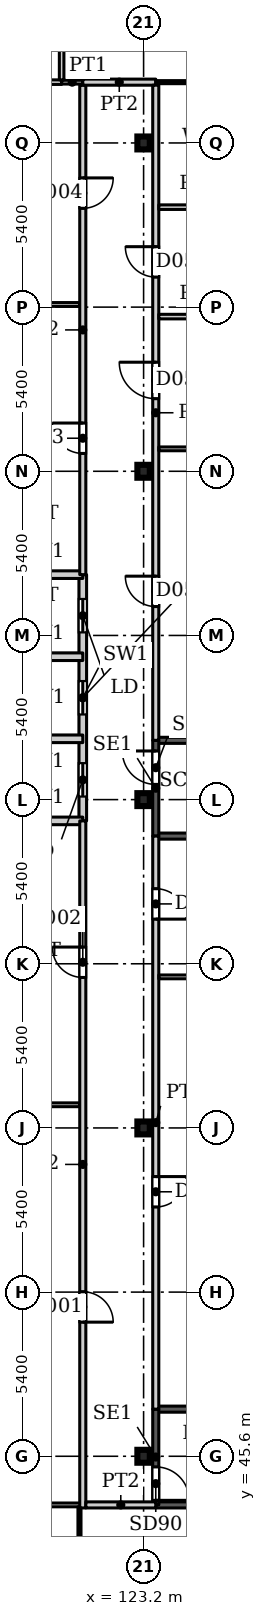
"""IFC4 building model, lengths in metres.
Left out: names, types, materials, properties, quantities, classifications, styles, units other than length and angle.
Written with IfcOpenShell. Run it as: python <this file> out.ifc"""

import sys

from ifc_helpers import new_model, si_unit, direction, frame, frame_2d, origin, origin_2d, place, context, subcontext, project, spatial, rectangle, i_section, extrude, source, transform, mapped, element, fill, save


model = new_model("IFC4")
c1 = context("Model", 3, precision=1e-05, world=origin(), true_north=direction((0.0, 1.0)))
c2 = subcontext(c1, "Body", "Model", "MODEL_VIEW")
j1 = project(units=[si_unit("LENGTHUNIT", "METRE"), si_unit("PLANEANGLEUNIT", "RADIAN")], contexts=[c1])
p1 = place(None, origin())
s1 = spatial("IfcSite", under=j1, at=p1, CompositionType="ELEMENT")
p2 = place(p1, origin())
s2 = spatial("IfcBuilding", under=s1, at=p2, CompositionType="ELEMENT")
p3 = place(p2, frame((0.0, 0.0, 26.0)))
s3 = spatial("IfcBuildingStorey", under=s2, at=p3, CompositionType="ELEMENT", Elevation=26.0)
for number, where, z_axis, x_axis in (
    (1, (123.2, 45.6, 0.0), (0.0, 0.0, 1.0), (1.0, 0.0, 0.0)),
    (2, (123.2, 56.4, 0.0), (0.0, 0.0, 1.0), (1.0, 0.0, 0.0)),
    (3, (123.2, 67.2, 0.0), (0.0, 0.0, 1.0), (1.0, 0.0, 0.0)),
    (4, (123.2, 78.0, 0.0), (0.0, 0.0, 1.0), (1.0, 0.0, 0.0)),
    (5, (123.2, 88.8, 0.0), (0.0, 0.0, 1.0), (1.0, 0.0, 0.0)),
):
    element("IfcColumn", number, at=place(p3, frame(where, z_axis=z_axis, x_axis=x_axis)), inside=s3, PredefinedType="COLUMN", context=c2, shape_type="SweptSolid", body=[
        extrude(i_section(OverallWidth=0.409, OverallDepth=0.425, WebThickness=0.033, FlangeThickness=0.052, FilletRadius=0.013, at=origin_2d()), origin(), (0.0, 0.0, 1.0), 4.5),
    ])
p4 = place(p3, frame((121.2, 66.5, 0.0), z_axis=(0.0, 0.0, 1.0), x_axis=(0.0, 1.0, 0.0)))
e6 = element("IfcWall", 6, at=p4, inside=s3, PredefinedType="PARTITIONING", context=c2, shape_type="SweptSolid", body=[
    extrude(rectangle(XDim=8.1, YDim=0.25, at=frame_2d((4.05, 0.0))), origin(), (0.0, 0.0, 1.0), 4.5),
])
p5 = place(p4, frame((0.8, 0.0, 0.0)))
e7 = element("IfcOpeningElement", 7, at=p5, cuts=e6, PredefinedType="OPENING", context=c2, shape_type="SweptSolid", body=[
    extrude(rectangle(XDim=1.1, YDim=2.2, at=frame_2d((0.55, 1.1))), frame((0.0, 0.135, 0.0), z_axis=(0.0, -1.0, 0.0), x_axis=(1.0, 0.0, 0.0)), (0.0, 0.0, 1.0), 0.27),
])
p6 = place(p4, frame((3.5, 0.0, 0.0)))
e8 = element("IfcOpeningElement", 8, at=p6, cuts=e6, PredefinedType="OPENING", context=c2, shape_type="SweptSolid", body=[
    extrude(rectangle(XDim=1.1, YDim=2.2, at=frame_2d((0.55, 1.1))), frame((0.0, 0.135, 0.0), z_axis=(0.0, -1.0, 0.0), x_axis=(1.0, 0.0, 0.0)), (0.0, 0.0, 1.0), 0.27),
])
p7 = place(p4, frame((6.2, 0.0, 0.0)))
e9 = element("IfcOpeningElement", 9, at=p7, cuts=e6, PredefinedType="OPENING", context=c2, shape_type="SweptSolid", body=[
    extrude(rectangle(XDim=1.1, YDim=2.2, at=frame_2d((0.55, 1.1))), frame((0.0, 0.135, 0.0), z_axis=(0.0, -1.0, 0.0), x_axis=(1.0, 0.0, 0.0)), (0.0, 0.0, 1.0), 0.27),
])
for number, where, z_axis, x_axis in (
    (10, (118.5, 66.5, 0.0), (0.0, 0.0, 1.0), (1.0, 0.0, 0.0)),
    (11, (118.5, 69.2, 0.0), (0.0, 0.0, 1.0), (1.0, 0.0, 0.0)),
    (12, (118.5, 71.9, 0.0), (0.0, 0.0, 1.0), (1.0, 0.0, 0.0)),
    (13, (118.5, 74.6, 0.0), (0.0, 0.0, 1.0), (1.0, 0.0, 0.0)),
):
    element("IfcWall", number, at=place(p3, frame(where, z_axis=z_axis, x_axis=x_axis)), inside=s3, PredefinedType="PARTITIONING", context=c2, shape_type="SweptSolid", body=[
        extrude(rectangle(XDim=2.7, YDim=0.25, at=frame_2d((1.35, 0.0))), origin(), (0.0, 0.0, 1.0), 4.5),
    ])
p8 = place(p3, frame((123.6, 44.0, 0.0), z_axis=(0.0, 0.0, 1.0), x_axis=(1.0, 0.0, 0.0)))
e14 = element("IfcWall", 14, at=p8, inside=s3, PredefinedType="SHEAR", context=c2, shape_type="SweptSolid", body=[
    extrude(rectangle(XDim=7.2, YDim=0.2, at=frame_2d((3.6, 0.0))), origin(), (0.0, 0.0, 1.0), 4.5),
])
p9 = place(p3, frame((123.6, 47.15, 0.0), z_axis=(0.0, 0.0, 1.0), x_axis=(1.0, 0.0, 0.0)))
e15 = element("IfcWall", 15, at=p9, inside=s3, PredefinedType="SHEAR", context=c2, shape_type="SweptSolid", body=[
    extrude(rectangle(XDim=8.4, YDim=0.2, at=frame_2d((4.2, 0.0))), origin(), (0.0, 0.0, 1.0), 4.5),
])
p10 = place(p3, frame((123.6, 44.0, 0.0), z_axis=(0.0, 0.0, 1.0), x_axis=(0.0, 1.0, 0.0)))
e16 = element("IfcWall", 16, at=p10, inside=s3, PredefinedType="SHEAR", context=c2, shape_type="SweptSolid", body=[
    extrude(rectangle(XDim=3.15, YDim=0.2, at=frame_2d((1.575, 0.0))), origin(), (0.0, 0.0, 1.0), 4.5),
])
p11 = place(p10, frame((0.15, 0.0, 0.0)))
e17 = element("IfcOpeningElement", 17, at=p11, cuts=e16, PredefinedType="OPENING", context=c2, shape_type="SweptSolid", body=[
    extrude(rectangle(XDim=1.1, YDim=2.2, at=frame_2d((0.55, 1.1))), frame((0.0, 0.11, 0.0), z_axis=(0.0, -1.0, 0.0), x_axis=(1.0, 0.0, 0.0)), (0.0, 0.0, 1.0), 0.22),
])
p12 = place(p3, frame((123.6, 66.0, 0.0), z_axis=(0.0, 0.0, 1.0), x_axis=(1.0, 0.0, 0.0)))
e18 = element("IfcWall", 18, at=p12, inside=s3, PredefinedType="SHEAR", context=c2, shape_type="SweptSolid", body=[
    extrude(rectangle(XDim=7.2, YDim=0.2, at=frame_2d((3.6, 0.0))), origin(), (0.0, 0.0, 1.0), 4.5),
])
p13 = place(p3, frame((123.6, 69.15, 0.0), z_axis=(0.0, 0.0, 1.0), x_axis=(1.0, 0.0, 0.0)))
e19 = element("IfcWall", 19, at=p13, inside=s3, PredefinedType="SHEAR", context=c2, shape_type="SweptSolid", body=[
    extrude(rectangle(XDim=8.4, YDim=0.2, at=frame_2d((4.2, 0.0))), origin(), (0.0, 0.0, 1.0), 4.5),
])
p14 = place(p3, frame((123.6, 66.0, 0.0), z_axis=(0.0, 0.0, 1.0), x_axis=(0.0, 1.0, 0.0)))
e20 = element("IfcWall", 20, at=p14, inside=s3, PredefinedType="SHEAR", context=c2, shape_type="SweptSolid", body=[
    extrude(rectangle(XDim=3.15, YDim=0.2, at=frame_2d((1.575, 0.0))), origin(), (0.0, 0.0, 1.0), 4.5),
])
p15 = place(p14, frame((1.7, 0.0, 0.0)))
e21 = element("IfcOpeningElement", 21, at=p15, cuts=e20, PredefinedType="OPENING", context=c2, shape_type="SweptSolid", body=[
    extrude(rectangle(XDim=1.1, YDim=2.2, at=frame_2d((0.55, 1.1))), frame((0.0, 0.11, 0.0), z_axis=(0.0, -1.0, 0.0), x_axis=(1.0, 0.0, 0.0)), (0.0, 0.0, 1.0), 0.22),
])
p16 = place(p3, frame((110.183, 90.8, 0.0), z_axis=(0.0, 0.0, 1.0), x_axis=(1.0, 0.0, 0.0)))
e22 = element("IfcWall", 22, at=p16, inside=s3, PredefinedType="PARTITIONING", context=c2, shape_type="SweptSolid", body=[
    extrude(rectangle(XDim=10.321, YDim=0.15, at=frame_2d((5.16, 0.0))), origin(), (0.0, 0.0, 1.0), 4.2),
])
p17 = place(p3, frame((112.862, 44.0, 0.0), z_axis=(0.0, 0.0, 1.0), x_axis=(1.0, 0.0, 0.0)))
e23 = element("IfcWall", 23, at=p17, inside=s3, PredefinedType="PARTITIONING", context=c2, shape_type="SweptSolid", body=[
    extrude(rectangle(XDim=8.279, YDim=0.125, at=frame_2d((4.14, 0.0))), origin(), (0.0, 0.0, 1.0), 4.2),
])
for number, where, z_axis, x_axis in (
    (24, (112.862, 57.162, 0.0), (0.0, 0.0, 1.0), (1.0, 0.0, 0.0)),
    (25, (112.862, 83.487, 0.0), (0.0, 0.0, 1.0), (1.0, 0.0, 0.0)),
):
    element("IfcWall", number, at=place(p3, frame(where, z_axis=z_axis, x_axis=x_axis)), inside=s3, PredefinedType="PARTITIONING", context=c2, shape_type="SweptSolid", body=[
        extrude(rectangle(XDim=8.238, YDim=0.125, at=frame_2d((4.119, 0.0))), origin(), (0.0, 0.0, 1.0), 4.2),
    ])
p18 = place(p3, frame((120.504, 90.8, 0.0), z_axis=(0.0, 0.0, 1.0), x_axis=(1.0, 0.0, 0.0)))
e26 = element("IfcWall", 26, at=p18, inside=s3, PredefinedType="PARTITIONING", context=c2, shape_type="SweptSolid", body=[
    extrude(rectangle(XDim=0.696, YDim=0.125, at=frame_2d((0.348, 0.0))), origin(), (0.0, 0.0, 1.0), 4.2),
])
p19 = place(p3, frame((120.504, 90.875, 0.0), z_axis=(0.0, 0.0, 1.0), x_axis=(0.0, 1.0, 0.0)))
e27 = element("IfcWall", 27, at=p19, inside=s3, PredefinedType="PARTITIONING", context=c2, shape_type="SweptSolid", body=[
    extrude(rectangle(XDim=8.225, YDim=0.15, at=frame_2d((4.113, 0.0))), origin(), (0.0, 0.0, 1.0), 4.2),
])
p20 = place(p3, frame((121.091, 35.3, 0.0), z_axis=(0.0, 0.0, 1.0), x_axis=(0.0, 1.0, 0.0)))
e28 = element("IfcWall", 28, at=p20, inside=s3, PredefinedType="PARTITIONING", context=c2, shape_type="SweptSolid", body=[
    extrude(rectangle(XDim=8.638, YDim=0.1, at=frame_2d((4.319, 0.0))), origin(), (0.0, 0.0, 1.0), 4.2),
])
p21 = place(p3, frame((121.2, 43.9, 0.0), z_axis=(0.0, 0.0, 1.0), x_axis=(0.0, 1.0, 0.0)))
e29 = element("IfcWall", 29, at=p21, inside=s3, PredefinedType="PARTITIONING", context=c2, shape_type="SweptSolid", body=[
    extrude(rectangle(XDim=22.6, YDim=0.2, at=frame_2d((11.3, 0.0))), origin(), (0.0, 0.0, 1.0), 4.2),
])
p22 = place(p21, frame((6.112, 0.0, 0.0)))
e30 = element("IfcOpeningElement", 30, at=p22, cuts=e29, PredefinedType="OPENING", context=c2, shape_type="SweptSolid", body=[
    extrude(rectangle(XDim=1.0, YDim=2.1, at=frame_2d((0.5, 1.05))), frame((0.0, 0.11, 0.0), z_axis=(0.0, -1.0, 0.0), x_axis=(1.0, 0.0, 0.0)), (0.0, 0.0, 1.0), 0.22),
])
p23 = place(p21, frame((17.45, 0.0, 0.0)))
e31 = element("IfcOpeningElement", 31, at=p23, cuts=e29, PredefinedType="OPENING", context=c2, shape_type="SweptSolid", body=[
    extrude(rectangle(XDim=1.0, YDim=2.1, at=frame_2d((0.5, 1.05))), frame((0.0, 0.11, 0.0), z_axis=(0.0, -1.0, 0.0), x_axis=(1.0, 0.0, 0.0)), (0.0, 0.0, 1.0), 0.22),
])
p24 = place(p3, frame((121.2, 74.6, 0.0), z_axis=(0.0, 0.0, 1.0), x_axis=(0.0, 1.0, 0.0)))
e32 = element("IfcWall", 32, at=p24, inside=s3, PredefinedType="PARTITIONING", context=c2, shape_type="SweptSolid", body=[
    extrude(rectangle(XDim=16.1, YDim=0.2, at=frame_2d((8.05, 0.0))), origin(), (0.0, 0.0, 1.0), 4.2),
])
p25 = place(p24, frame((3.987, 0.0, 0.0)))
e33 = element("IfcOpeningElement", 33, at=p25, cuts=e32, PredefinedType="OPENING", context=c2, shape_type="SweptSolid", body=[
    extrude(rectangle(XDim=1.0, YDim=2.1, at=frame_2d((0.5, 1.05))), frame((0.0, 0.11, 0.0), z_axis=(0.0, -1.0, 0.0), x_axis=(1.0, 0.0, 0.0)), (0.0, 0.0, 1.0), 0.22),
])
p26 = place(p24, frame((12.05, 0.0, 0.0)))
e34 = element("IfcOpeningElement", 34, at=p26, cuts=e32, PredefinedType="OPENING", context=c2, shape_type="SweptSolid", body=[
    extrude(rectangle(XDim=1.0, YDim=2.1, at=frame_2d((0.5, 1.05))), frame((0.0, 0.11, 0.0), z_axis=(0.0, -1.0, 0.0), x_axis=(1.0, 0.0, 0.0)), (0.0, 0.0, 1.0), 0.22),
])
p27 = place(p3, frame((121.2, 90.8, 0.0), z_axis=(0.0, 0.0, 1.0), x_axis=(1.0, 0.0, 0.0)))
e35 = element("IfcWall", 35, at=p27, inside=s3, PredefinedType="PARTITIONING", context=c2, shape_type="SweptSolid", body=[
    extrude(rectangle(XDim=2.4, YDim=0.2, at=frame_2d((1.2, 0.0))), origin(), (0.0, 0.0, 1.0), 4.2),
])
p28 = place(p3, frame((121.3, 44.0, 0.0), z_axis=(0.0, 0.0, 1.0), x_axis=(1.0, 0.0, 0.0)))
e36 = element("IfcWall", 36, at=p28, inside=s3, PredefinedType="PARTITIONING", context=c2, shape_type="SweptSolid", body=[
    extrude(rectangle(XDim=2.3, YDim=0.2, at=frame_2d((1.15, 0.0))), origin(), (0.0, 0.0, 1.0), 4.2),
])
p29 = place(p3, frame((123.6, 47.15, 0.0), z_axis=(0.0, 0.0, 1.0), x_axis=(0.0, 1.0, 0.0)))
e37 = element("IfcWall", 37, at=p29, inside=s3, PredefinedType="PARTITIONING", context=c2, shape_type="SweptSolid", body=[
    extrude(rectangle(XDim=18.85, YDim=0.2, at=frame_2d((9.425, 0.0))), origin(), (0.0, 0.0, 1.0), 4.2),
])
p30 = place(p29, frame((6.65, 0.0, 0.0)))
e38 = element("IfcOpeningElement", 38, at=p30, cuts=e37, PredefinedType="OPENING", context=c2, shape_type="SweptSolid", body=[
    extrude(rectangle(XDim=1.0, YDim=2.1, at=frame_2d((0.5, 1.05))), frame((0.0, 0.11, 0.0), z_axis=(0.0, -1.0, 0.0), x_axis=(1.0, 0.0, 0.0)), (0.0, 0.0, 1.0), 0.22),
])
p31 = place(p29, frame((16.119, 0.0, 0.0)))
e39 = element("IfcOpeningElement", 39, at=p31, cuts=e37, PredefinedType="OPENING", context=c2, shape_type="SweptSolid", body=[
    extrude(rectangle(XDim=1.0, YDim=2.1, at=frame_2d((0.5, 1.05))), frame((0.0, 0.11, 0.0), z_axis=(0.0, -1.0, 0.0), x_axis=(1.0, 0.0, 0.0)), (0.0, 0.0, 1.0), 0.22),
])
p32 = place(p3, frame((123.6, 69.15, 0.0), z_axis=(0.0, 0.0, 1.0), x_axis=(0.0, 1.0, 0.0)))
e40 = element("IfcWall", 40, at=p32, inside=s3, PredefinedType="PARTITIONING", context=c2, shape_type="SweptSolid", body=[
    extrude(rectangle(XDim=21.55, YDim=0.2, at=frame_2d((10.775, 0.0))), origin(), (0.0, 0.0, 1.0), 4.2),
])
p33 = place(p32, frame((4.4, 0.0, 0.0)))
e41 = element("IfcOpeningElement", 41, at=p33, cuts=e40, PredefinedType="OPENING", context=c2, shape_type="SweptSolid", body=[
    extrude(rectangle(XDim=1.0, YDim=2.1, at=frame_2d((0.5, 1.05))), frame((0.0, 0.11, 0.0), z_axis=(0.0, -1.0, 0.0), x_axis=(1.0, 0.0, 0.0)), (0.0, 0.0, 1.0), 0.22),
])
p34 = place(p32, frame((15.238, 0.0, 0.0)))
e42 = element("IfcOpeningElement", 42, at=p34, cuts=e40, PredefinedType="OPENING", context=c2, shape_type="SweptSolid", body=[
    extrude(rectangle(XDim=1.0, YDim=2.1, at=frame_2d((0.5, 1.05))), frame((0.0, 0.11, 0.0), z_axis=(0.0, -1.0, 0.0), x_axis=(1.0, 0.0, 0.0)), (0.0, 0.0, 1.0), 0.22),
])
p35 = place(p32, frame((11.238, 0.0, 0.0)))
e43 = element("IfcOpeningElement", 43, at=p35, cuts=e40, PredefinedType="OPENING", context=c2, shape_type="SweptSolid", body=[
    extrude(rectangle(XDim=1.2, YDim=2.1, at=frame_2d((0.6, 1.05))), frame((0.0, 0.11, 0.0), z_axis=(0.0, -1.0, 0.0), x_axis=(1.0, 0.0, 0.0)), (0.0, 0.0, 1.0), 0.22),
])
p36 = place(p3, frame((123.6, 90.8, 0.0), z_axis=(0.0, 0.0, 1.0), x_axis=(1.0, 0.0, 0.0)))
e44 = element("IfcWall", 44, at=p36, inside=s3, PredefinedType="PARTITIONING", context=c2, shape_type="SweptSolid", body=[
    extrude(rectangle(XDim=8.4, YDim=0.1, at=frame_2d((4.2, 0.0))), origin(), (0.0, 0.0, 1.0), 4.2),
])
for number, where, z_axis, x_axis in (
    (45, (123.7, 61.369, 0.0), (0.0, 0.0, 1.0), (1.0, 0.0, 0.0)),
    (46, (123.7, 78.738, 0.0), (0.0, 0.0, 1.0), (1.0, 0.0, 0.0)),
):
    element("IfcWall", number, at=place(p3, frame(where, z_axis=z_axis, x_axis=x_axis)), inside=s3, PredefinedType="PARTITIONING", context=c2, shape_type="SweptSolid", body=[
        extrude(rectangle(XDim=8.3, YDim=0.125, at=frame_2d((4.15, 0.0))), origin(), (0.0, 0.0, 1.0), 4.2),
    ])
for number, where, z_axis, x_axis in (
    (47, (123.7, 83.088, 0.0), (0.0, 0.0, 1.0), (1.0, 0.0, 0.0)),
    (48, (123.7, 86.688, 0.0), (0.0, 0.0, 1.0), (1.0, 0.0, 0.0)),
):
    element("IfcWall", number, at=place(p3, frame(where, z_axis=z_axis, x_axis=x_axis)), inside=s3, PredefinedType="PARTITIONING", context=c2, shape_type="SweptSolid", body=[
        extrude(rectangle(XDim=3.025, YDim=0.15, at=frame_2d((1.513, 0.0))), origin(), (0.0, 0.0, 1.0), 4.2),
    ])
m1 = source(origin(), c2, "Body", "SweptSolid", [
    extrude(rectangle(XDim=1.1, YDim=2.2, at=frame_2d((0.55, 1.1))), frame((0.0, 0.025, 0.0), z_axis=(0.0, -1.0, 0.0), x_axis=(1.0, 0.0, 0.0)), (0.0, 0.0, 1.0), 0.05),
])
p37 = place(p5, origin())
e49 = element("IfcDoor", 49, at=p37, inside=s3, OperationType="SLIDING_TO_LEFT", PredefinedType="DOOR", context=c2, shape_type="MappedRepresentation", body=[
    mapped(m1, transform((0.0, 0.0, 0.0), x_axis=(1.0, 0.0, 0.0), y_axis=(0.0, 1.0, 0.0), z_axis=(0.0, 0.0, 1.0), scale=1.0)),
])
fill(e7, e49)
p38 = place(p6, origin())
e50 = element("IfcDoor", 50, at=p38, inside=s3, OperationType="SLIDING_TO_LEFT", PredefinedType="DOOR", context=c2, shape_type="MappedRepresentation", body=[
    mapped(m1, transform((0.0, 0.0, 0.0), x_axis=(1.0, 0.0, 0.0), y_axis=(0.0, 1.0, 0.0), z_axis=(0.0, 0.0, 1.0), scale=1.0)),
])
fill(e8, e50)
p39 = place(p7, origin())
e51 = element("IfcDoor", 51, at=p39, inside=s3, OperationType="SLIDING_TO_LEFT", PredefinedType="DOOR", context=c2, shape_type="MappedRepresentation", body=[
    mapped(m1, transform((0.0, 0.0, 0.0), x_axis=(1.0, 0.0, 0.0), y_axis=(0.0, 1.0, 0.0), z_axis=(0.0, 0.0, 1.0), scale=1.0)),
])
fill(e9, e51)
m2 = source(origin(), c2, "Body", "SweptSolid", [
    extrude(rectangle(XDim=1.1, YDim=2.2, at=frame_2d((0.55, 1.1))), frame((0.0, 0.025, 0.0), z_axis=(0.0, -1.0, 0.0), x_axis=(1.0, 0.0, 0.0)), (0.0, 0.0, 1.0), 0.05),
])
p40 = place(p11, origin())
e52 = element("IfcDoor", 52, at=p40, inside=s3, OperationType="SINGLE_SWING_RIGHT", PredefinedType="DOOR", context=c2, shape_type="MappedRepresentation", body=[
    mapped(m2, transform((0.0, 0.0, 0.0), x_axis=(1.0, 0.0, 0.0), y_axis=(0.0, 1.0, 0.0), z_axis=(0.0, 0.0, 1.0), scale=1.0)),
])
fill(e17, e52)
p41 = place(p15, origin())
e53 = element("IfcDoor", 53, at=p41, inside=s3, OperationType="SINGLE_SWING_LEFT", PredefinedType="DOOR", context=c2, shape_type="MappedRepresentation", body=[
    mapped(m2, transform((0.0, 0.0, 0.0), x_axis=(1.0, 0.0, 0.0), y_axis=(0.0, 1.0, 0.0), z_axis=(0.0, 0.0, 1.0), scale=1.0)),
])
fill(e21, e53)
m3 = source(origin(), c2, "Body", "SweptSolid", [
    extrude(rectangle(XDim=1.0, YDim=2.1, at=frame_2d((0.5, 1.05))), frame((0.0, 0.025, 0.0), z_axis=(0.0, -1.0, 0.0), x_axis=(1.0, 0.0, 0.0)), (0.0, 0.0, 1.0), 0.05),
])
p42 = place(p22, origin())
e54 = element("IfcDoor", 54, at=p42, inside=s3, OperationType="SINGLE_SWING_RIGHT", PredefinedType="DOOR", context=c2, shape_type="MappedRepresentation", body=[
    mapped(m3, transform((0.0, 0.0, 0.0), x_axis=(1.0, 0.0, 0.0), y_axis=(0.0, 1.0, 0.0), z_axis=(0.0, 0.0, 1.0), scale=1.0)),
])
fill(e30, e54)
p43 = place(p23, origin())
e55 = element("IfcDoor", 55, at=p43, inside=s3, OperationType="SINGLE_SWING_LEFT", PredefinedType="DOOR", context=c2, shape_type="MappedRepresentation", body=[
    mapped(m3, transform((0.0, 0.0, 0.0), x_axis=(1.0, 0.0, 0.0), y_axis=(0.0, 1.0, 0.0), z_axis=(0.0, 0.0, 1.0), scale=1.0)),
])
fill(e31, e55)
p44 = place(p25, origin())
e56 = element("IfcDoor", 56, at=p44, inside=s3, OperationType="SINGLE_SWING_LEFT", PredefinedType="DOOR", context=c2, shape_type="MappedRepresentation", body=[
    mapped(m3, transform((0.0, 0.0, 0.0), x_axis=(1.0, 0.0, 0.0), y_axis=(0.0, 1.0, 0.0), z_axis=(0.0, 0.0, 1.0), scale=1.0)),
])
fill(e33, e56)
p45 = place(p26, origin())
e57 = element("IfcDoor", 57, at=p45, inside=s3, OperationType="SINGLE_SWING_RIGHT", PredefinedType="DOOR", context=c2, shape_type="MappedRepresentation", body=[
    mapped(m3, transform((0.0, 0.0, 0.0), x_axis=(1.0, 0.0, 0.0), y_axis=(0.0, 1.0, 0.0), z_axis=(0.0, 0.0, 1.0), scale=1.0)),
])
fill(e34, e57)
p46 = place(p30, origin())
e58 = element("IfcDoor", 58, at=p46, inside=s3, OperationType="SINGLE_SWING_RIGHT", PredefinedType="DOOR", context=c2, shape_type="MappedRepresentation", body=[
    mapped(m3, transform((0.0, 0.0, 0.0), x_axis=(1.0, 0.0, 0.0), y_axis=(0.0, 1.0, 0.0), z_axis=(0.0, 0.0, 1.0), scale=1.0)),
])
fill(e38, e58)
p47 = place(p31, origin())
e59 = element("IfcDoor", 59, at=p47, inside=s3, OperationType="SINGLE_SWING_RIGHT", PredefinedType="DOOR", context=c2, shape_type="MappedRepresentation", body=[
    mapped(m3, transform((0.0, 0.0, 0.0), x_axis=(1.0, 0.0, 0.0), y_axis=(0.0, 1.0, 0.0), z_axis=(0.0, 0.0, 1.0), scale=1.0)),
])
fill(e39, e59)
p48 = place(p33, origin())
e60 = element("IfcDoor", 60, at=p48, inside=s3, OperationType="SINGLE_SWING_LEFT", PredefinedType="DOOR", context=c2, shape_type="MappedRepresentation", body=[
    mapped(m3, transform((0.0, 0.0, 0.0), x_axis=(1.0, 0.0, 0.0), y_axis=(0.0, 1.0, 0.0), z_axis=(0.0, 0.0, 1.0), scale=1.0)),
])
fill(e41, e60)
p49 = place(p34, origin())
e61 = element("IfcDoor", 61, at=p49, inside=s3, OperationType="SINGLE_SWING_LEFT", PredefinedType="DOOR", context=c2, shape_type="MappedRepresentation", body=[
    mapped(m3, transform((0.0, 0.0, 0.0), x_axis=(1.0, 0.0, 0.0), y_axis=(0.0, 1.0, 0.0), z_axis=(0.0, 0.0, 1.0), scale=1.0)),
])
fill(e42, e61)
m4 = source(origin(), c2, "Body", "SweptSolid", [
    extrude(rectangle(XDim=1.2, YDim=2.1, at=frame_2d((0.6, 1.05))), frame((0.0, 0.025, 0.0), z_axis=(0.0, -1.0, 0.0), x_axis=(1.0, 0.0, 0.0)), (0.0, 0.0, 1.0), 0.05),
])
p50 = place(p35, origin())
e62 = element("IfcDoor", 62, at=p50, inside=s3, OperationType="SINGLE_SWING_LEFT", PredefinedType="DOOR", context=c2, shape_type="MappedRepresentation", body=[
    mapped(m4, transform((0.0, 0.0, 0.0), x_axis=(1.0, 0.0, 0.0), y_axis=(0.0, 1.0, 0.0), z_axis=(0.0, 0.0, 1.0), scale=1.0)),
])
fill(e43, e62)
save(model, sys.argv[1])
